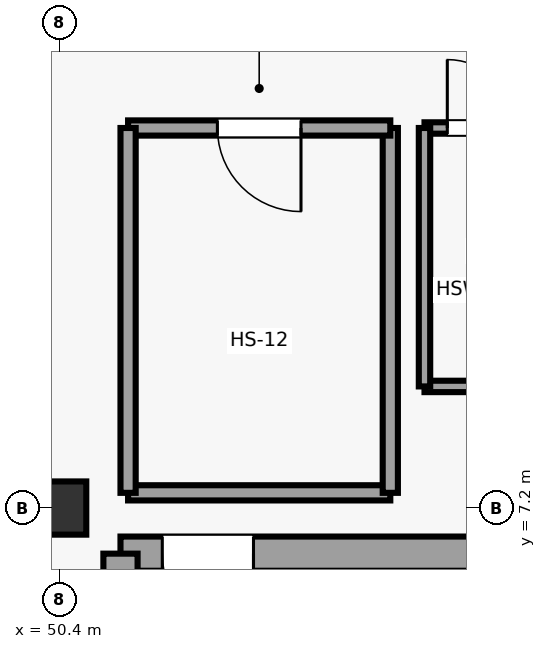
"""IFC4 building model, lengths in metres.
Left out: names, types, materials, properties, quantities, classifications, styles, units other than length and angle.
Written with IfcOpenShell. Run it as: python <this file> out.ifc"""

import sys

from ifc_helpers import new_model, si_unit, direction, frame, frame_2d, origin, origin_2d, place, context, subcontext, project, spatial, rectangle, extrude, element, fill, save


model = new_model("IFC4")
c1 = context("Model", 3, precision=1e-05, world=origin(), true_north=direction((0.0, 1.0)))
c2 = subcontext(c1, "Body", "Model", "MODEL_VIEW")
j1 = project(units=[si_unit("LENGTHUNIT", "METRE"), si_unit("PLANEANGLEUNIT", "RADIAN")], contexts=[c1])
p1 = place(None, origin())
s1 = spatial("IfcSite", under=j1, at=p1, CompositionType="ELEMENT")
p2 = place(p1, origin())
s2 = spatial("IfcBuilding", under=s1, at=p2, CompositionType="ELEMENT")
p3 = place(p2, frame((0.0, 0.0, 9.6)))
s3 = spatial("IfcBuildingStorey", under=s2, at=p3, CompositionType="ELEMENT", Elevation=9.6)
p4 = place(p3, frame((50.4, 7.2, 0.0), z_axis=(0.0, 0.0, 1.0), x_axis=(1.0, 0.0, 0.0)))
e1 = element("IfcColumn", 1, at=p4, inside=s3, PredefinedType="COLUMN", context=c2, shape_type="SweptSolid", body=[
    extrude(rectangle(XDim=0.7, YDim=0.7, at=origin_2d()), origin(), (0.0, 0.0, 1.0), 4.2),
])
p5 = place(p3, frame((51.2, 6.6, 0.0), z_axis=(0.0, 0.0, 1.0), x_axis=(1.0, 0.0, 0.0)))
e2 = element("IfcWall", 2, at=p5, inside=s3, PredefinedType="SHEAR", context=c2, shape_type="SweptSolid", body=[
    extrude(rectangle(XDim=12.8, YDim=0.45, at=frame_2d((6.4, 0.0))), origin(), (0.0, 0.0, 1.0), 3.88),
])
p6 = place(p5, frame((0.55, 0.0, 0.0)))
e3 = element("IfcOpeningElement", 3, at=p6, cuts=e2, PredefinedType="OPENING", context=c2, shape_type="SweptSolid", body=[
    extrude(rectangle(XDim=1.2, YDim=2.25, at=frame_2d((0.6, 1.125))), frame((0.0, 0.235, 0.0), z_axis=(0.0, -1.0, 0.0), x_axis=(1.0, 0.0, 0.0)), (0.0, 0.0, 1.0), 0.47),
])
p7 = place(p5, frame((10.458, 0.0, 0.0)))
e4 = element("IfcOpeningElement", 4, at=p7, cuts=e2, PredefinedType="OPENING", context=c2, shape_type="SweptSolid", body=[
    extrude(rectangle(XDim=1.1, YDim=2.2, at=frame_2d((0.55, 1.1))), frame((0.0, 0.235, 0.0), z_axis=(0.0, -1.0, 0.0), x_axis=(1.0, 0.0, 0.0)), (0.0, 0.0, 1.0), 0.47),
])
p8 = place(p3, frame((51.2, 0.5, 0.0), z_axis=(0.0, 0.0, 1.0), x_axis=(0.0, 1.0, 0.0)))
e5 = element("IfcWall", 5, at=p8, inside=s3, PredefinedType="SHEAR", context=c2, shape_type="SweptSolid", body=[
    extrude(rectangle(XDim=6.1, YDim=0.45, at=frame_2d((3.05, 0.0))), origin(), (0.0, 0.0, 1.0), 3.88),
])
p9 = place(p3, frame((51.3, 7.4, 0.0), z_axis=(0.0, 0.0, 1.0), x_axis=(1.0, 0.0, 0.0)))
e6 = element("IfcWall", 6, at=p9, inside=s3, PredefinedType="PARTITIONING", context=c2, shape_type="SweptSolid", body=[
    extrude(rectangle(XDim=3.45, YDim=0.2, at=frame_2d((1.725, 0.0))), origin(), (0.0, 0.0, 1.0), 2.94),
])
p10 = place(p3, frame((54.75, 7.4, 0.0), z_axis=(0.0, 0.0, 1.0), x_axis=(0.0, 1.0, 0.0)))
e7 = element("IfcWall", 7, at=p10, inside=s3, PredefinedType="PARTITIONING", context=c2, shape_type="SweptSolid", body=[
    extrude(rectangle(XDim=4.8, YDim=0.2, at=frame_2d((2.4, 0.0))), origin(), (0.0, 0.0, 1.0), 2.94),
])
p11 = place(p3, frame((54.75, 12.2, 0.0), z_axis=(0.0, 0.0, 1.0), x_axis=(-1.0, 0.0, 0.0)))
e8 = element("IfcWall", 8, at=p11, inside=s3, PredefinedType="PARTITIONING", context=c2, shape_type="SweptSolid", body=[
    extrude(rectangle(XDim=3.45, YDim=0.2, at=frame_2d((1.725, 0.0))), origin(), (0.0, 0.0, 1.0), 2.94),
])
p12 = place(p11, frame((1.175, 0.0, 0.0)))
e9 = element("IfcOpeningElement", 9, at=p12, cuts=e8, PredefinedType="OPENING", context=c2, shape_type="SweptSolid", body=[
    extrude(rectangle(XDim=1.1, YDim=2.25, at=frame_2d((0.55, 1.125))), frame((0.0, 0.11, 0.0), z_axis=(0.0, -1.0, 0.0), x_axis=(1.0, 0.0, 0.0)), (0.0, 0.0, 1.0), 0.22),
])
p13 = place(p3, frame((51.3, 12.2, 0.0), z_axis=(0.0, 0.0, 1.0), x_axis=(0.0, -1.0, 0.0)))
e10 = element("IfcWall", 10, at=p13, inside=s3, PredefinedType="PARTITIONING", context=c2, shape_type="SweptSolid", body=[
    extrude(rectangle(XDim=4.8, YDim=0.2, at=frame_2d((2.4, 0.0))), origin(), (0.0, 0.0, 1.0), 2.94),
])
p14 = place(p3, frame((55.2, 8.8, 0.0), z_axis=(0.0, 0.0, 1.0), x_axis=(1.0, 0.0, 0.0)))
e11 = element("IfcWall", 11, at=p14, inside=s3, PredefinedType="PARTITIONING", context=c2, shape_type="SweptSolid", body=[
    extrude(rectangle(XDim=1.5, YDim=0.15, at=frame_2d((0.75, 0.0))), origin(), (0.0, 0.0, 1.0), 2.94),
])
p15 = place(p3, frame((56.7, 12.2, 0.0), z_axis=(0.0, 0.0, 1.0), x_axis=(-1.0, 0.0, 0.0)))
e12 = element("IfcWall", 12, at=p15, inside=s3, PredefinedType="PARTITIONING", context=c2, shape_type="SweptSolid", body=[
    extrude(rectangle(XDim=1.5, YDim=0.15, at=frame_2d((0.75, 0.0))), origin(), (0.0, 0.0, 1.0), 2.94),
])
p16 = place(p15, frame((0.3, 0.0, 0.0)))
e13 = element("IfcOpeningElement", 13, at=p16, cuts=e12, PredefinedType="OPENING", context=c2, shape_type="SweptSolid", body=[
    extrude(rectangle(XDim=0.9, YDim=2.15, at=frame_2d((0.45, 1.075))), frame((0.0, 0.085, 0.0), z_axis=(0.0, -1.0, 0.0), x_axis=(1.0, 0.0, 0.0)), (0.0, 0.0, 1.0), 0.17),
])
p17 = place(p3, frame((55.2, 12.2, 0.0), z_axis=(0.0, 0.0, 1.0), x_axis=(0.0, -1.0, 0.0)))
e14 = element("IfcWall", 14, at=p17, inside=s3, PredefinedType="PARTITIONING", context=c2, shape_type="SweptSolid", body=[
    extrude(rectangle(XDim=3.4, YDim=0.15, at=frame_2d((1.7, 0.0))), origin(), (0.0, 0.0, 1.0), 2.94),
])
p18 = place(p6, frame((1.2, 0.0, 0.0), z_axis=(0.0, 0.0, 1.0), x_axis=(-1.0, 0.0, 0.0)))
e15 = element("IfcDoor", 15, at=p18, inside=s3, OperationType="SINGLE_SWING_RIGHT", PredefinedType="DOOR", context=c2, shape_type="SweptSolid", body=[
    extrude(rectangle(XDim=1.2, YDim=2.25, at=frame_2d((0.6, 1.125))), frame((0.0, 0.025, 0.0), z_axis=(0.0, -1.0, 0.0), x_axis=(1.0, 0.0, 0.0)), (0.0, 0.0, 1.0), 0.05),
])
fill(e3, e15)
p19 = place(p12, origin())
e16 = element("IfcDoor", 16, at=p19, inside=s3, OperationType="SINGLE_SWING_LEFT", PredefinedType="DOOR", context=c2, shape_type="SweptSolid", body=[
    extrude(rectangle(XDim=1.1, YDim=2.25, at=frame_2d((0.55, 1.125))), frame((0.0, 0.025, 0.0), z_axis=(0.0, -1.0, 0.0), x_axis=(1.0, 0.0, 0.0)), (0.0, 0.0, 1.0), 0.05),
])
fill(e9, e16)
p20 = place(p16, frame((0.9, 0.0, 0.0), z_axis=(0.0, 0.0, 1.0), x_axis=(-1.0, 0.0, 0.0)))
e17 = element("IfcDoor", 17, at=p20, inside=s3, OperationType="SINGLE_SWING_RIGHT", PredefinedType="DOOR", context=c2, shape_type="SweptSolid", body=[
    extrude(rectangle(XDim=0.9, YDim=2.15, at=frame_2d((0.45, 1.075))), frame((0.0, 0.025, 0.0), z_axis=(0.0, -1.0, 0.0), x_axis=(1.0, 0.0, 0.0)), (0.0, 0.0, 1.0), 0.05),
])
fill(e13, e17)
save(model, sys.argv[1])
